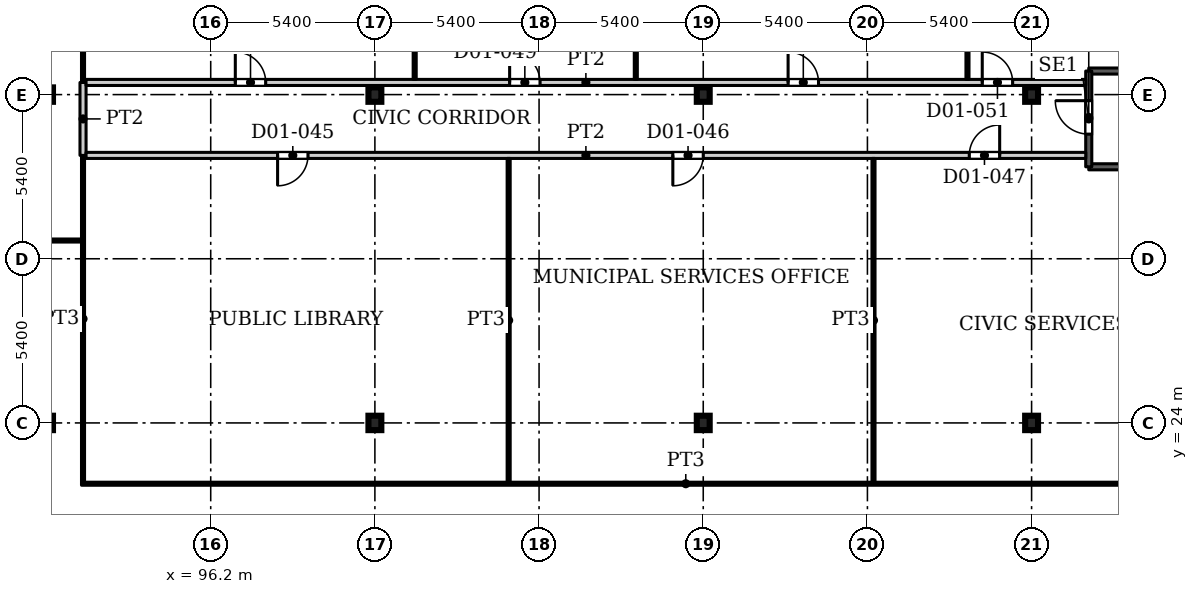
"""IFC4 building model, lengths in metres.
Left out: names, types, materials, properties, quantities, classifications, styles, units other than length and angle.
Written with IfcOpenShell. Run it as: python <this file> out.ifc"""

import sys

from ifc_helpers import new_model, si_unit, direction, frame, frame_2d, origin, origin_2d, place, context, subcontext, project, spatial, rectangle, i_section, extrude, source, transform, mapped, element, fill, save


model = new_model("IFC4")
c1 = context("Model", 3, precision=1e-05, world=origin(), true_north=direction((0.0, 1.0)))
c2 = subcontext(c1, "Body", "Model", "MODEL_VIEW")
j1 = project(units=[si_unit("LENGTHUNIT", "METRE"), si_unit("PLANEANGLEUNIT", "RADIAN")], contexts=[c1])
p1 = place(None, origin())
s1 = spatial("IfcSite", under=j1, at=p1, CompositionType="ELEMENT")
p2 = place(p1, origin())
s2 = spatial("IfcBuilding", under=s1, at=p2, CompositionType="ELEMENT")
p3 = place(p2, frame((0.0, 0.0, 7.5)))
s3 = spatial("IfcBuildingStorey", under=s2, at=p3, CompositionType="ELEMENT", Elevation=7.5)
for number, where, z_axis, x_axis in (
    (1, (90.8, 24.0, 0.0), (0.0, 0.0, 1.0), (1.0, 0.0, 0.0)),
    (2, (101.6, 24.0, 0.0), (0.0, 0.0, 1.0), (1.0, 0.0, 0.0)),
    (3, (112.4, 24.0, 0.0), (0.0, 0.0, 1.0), (1.0, 0.0, 0.0)),
    (4, (123.2, 24.0, 0.0), (0.0, 0.0, 1.0), (1.0, 0.0, 0.0)),
    (5, (90.8, 34.8, 0.0), (0.0, 0.0, 1.0), (1.0, 0.0, 0.0)),
    (6, (101.6, 34.8, 0.0), (0.0, 0.0, 1.0), (1.0, 0.0, 0.0)),
    (7, (112.4, 34.8, 0.0), (0.0, 0.0, 1.0), (1.0, 0.0, 0.0)),
    (8, (123.2, 34.8, 0.0), (0.0, 0.0, 1.0), (1.0, 0.0, 0.0)),
):
    element("IfcColumn", number, at=place(p3, frame(where, z_axis=z_axis, x_axis=x_axis)), inside=s3, PredefinedType="COLUMN", context=c2, shape_type="SweptSolid", body=[
        extrude(i_section(OverallWidth=0.424, OverallDepth=0.474, WebThickness=0.048, FlangeThickness=0.077, FilletRadius=0.014, at=origin_2d()), origin(), (0.0, 0.0, 1.0), 5.0),
    ])
p4 = place(p3, frame((125.08, 32.425, 0.0), z_axis=(0.0, 0.0, 1.0), x_axis=(1.0, 0.0, 0.0)))
e9 = element("IfcWall", 9, at=p4, inside=s3, PredefinedType="SHEAR", context=c2, shape_type="SweptSolid", body=[
    extrude(rectangle(XDim=5.72, YDim=0.2, at=frame_2d((2.86, 0.0))), origin(), (0.0, 0.0, 1.0), 5.0),
])
p5 = place(p3, frame((125.08, 35.575, 0.0), z_axis=(0.0, 0.0, 1.0), x_axis=(1.0, 0.0, 0.0)))
e10 = element("IfcWall", 10, at=p5, inside=s3, PredefinedType="SHEAR", context=c2, shape_type="SweptSolid", body=[
    extrude(rectangle(XDim=6.92, YDim=0.2, at=frame_2d((3.46, 0.0))), origin(), (0.0, 0.0, 1.0), 5.0),
])
p6 = place(p3, frame((125.08, 32.425, 0.0), z_axis=(0.0, 0.0, 1.0), x_axis=(0.0, 1.0, 0.0)))
e11 = element("IfcWall", 11, at=p6, inside=s3, PredefinedType="SHEAR", context=c2, shape_type="SweptSolid", body=[
    extrude(rectangle(XDim=3.15, YDim=0.2, at=frame_2d((1.575, 0.0))), origin(), (0.0, 0.0, 1.0), 5.0),
])
p7 = place(p6, frame((1.075, 0.0, 0.0)))
e12 = element("IfcOpeningElement", 12, at=p7, cuts=e11, PredefinedType="OPENING", context=c2, shape_type="SweptSolid", body=[
    extrude(rectangle(XDim=1.1, YDim=2.2, at=frame_2d((0.55, 1.1))), frame((0.0, 0.11, 0.0), z_axis=(0.0, -1.0, 0.0), x_axis=(1.0, 0.0, 0.0)), (0.0, 0.0, 1.0), 0.22),
])
p8 = place(p3, frame((53.649, 30.0, 0.0), z_axis=(0.0, 0.0, 1.0), x_axis=(1.0, 0.0, 0.0)))
e13 = element("IfcWall", 13, at=p8, inside=s3, PredefinedType="PARTITIONING", context=c2, shape_type="SweptSolid", body=[
    extrude(rectangle(XDim=38.301, YDim=0.1, at=frame_2d((19.15, 0.0))), origin(), (0.0, 0.0, 1.0), 4.68),
])
p9 = place(p3, frame((91.95, 22.0, 0.0), z_axis=(0.0, 0.0, 1.0), x_axis=(1.0, 0.0, 0.0)))
e14 = element("IfcWall", 14, at=p9, inside=s3, PredefinedType="PARTITIONING", context=c2, shape_type="SweptSolid", body=[
    extrude(rectangle(XDim=39.751, YDim=0.1, at=frame_2d((19.875, 0.0))), origin(), (0.0, 0.0, 1.0), 4.68),
])
p10 = place(p3, frame((92.0, 22.05, 0.0), z_axis=(0.0, 0.0, 1.0), x_axis=(0.0, 1.0, 0.0)))
e15 = element("IfcWall", 15, at=p10, inside=s3, PredefinedType="PARTITIONING", context=c2, shape_type="SweptSolid", body=[
    extrude(rectangle(XDim=10.75, YDim=0.1, at=frame_2d((5.375, 0.0))), origin(), (0.0, 0.0, 1.0), 4.68),
])
p11 = place(p3, frame((92.0, 32.8, 0.0), z_axis=(0.0, 0.0, 1.0), x_axis=(0.0, 1.0, 0.0)))
e16 = element("IfcWall", 16, at=p11, inside=s3, PredefinedType="PARTITIONING", context=c2, shape_type="SweptSolid", body=[
    extrude(rectangle(XDim=2.4, YDim=0.2, at=frame_2d((1.2, 0.0))), origin(), (0.0, 0.0, 1.0), 4.68),
])
p12 = place(p3, frame((92.0, 35.2, 0.0), z_axis=(0.0, 0.0, 1.0), x_axis=(0.0, 1.0, 0.0)))
e17 = element("IfcWall", 17, at=p12, inside=s3, PredefinedType="PARTITIONING", context=c2, shape_type="SweptSolid", body=[
    extrude(rectangle(XDim=8.6, YDim=0.1, at=frame_2d((4.3, 0.0))), origin(), (0.0, 0.0, 1.0), 4.68),
])
p13 = place(p3, frame((92.1, 32.8, 0.0), z_axis=(0.0, 0.0, 1.0), x_axis=(1.0, 0.0, 0.0)))
e18 = element("IfcWall", 18, at=p13, inside=s3, PredefinedType="PARTITIONING", context=c2, shape_type="SweptSolid", body=[
    extrude(rectangle(XDim=32.881, YDim=0.2, at=frame_2d((16.44, 0.0))), origin(), (0.0, 0.0, 1.0), 4.68),
])
p14 = place(p13, frame((6.3, 0.0, 0.0)))
e19 = element("IfcOpeningElement", 19, at=p14, cuts=e18, PredefinedType="OPENING", context=c2, shape_type="SweptSolid", body=[
    extrude(rectangle(XDim=1.0, YDim=2.1, at=frame_2d((0.5, 1.05))), frame((0.0, 0.11, 0.0), z_axis=(0.0, -1.0, 0.0), x_axis=(1.0, 0.0, 0.0)), (0.0, 0.0, 1.0), 0.22),
])
p15 = place(p13, frame((19.3, 0.0, 0.0)))
e20 = element("IfcOpeningElement", 20, at=p15, cuts=e18, PredefinedType="OPENING", context=c2, shape_type="SweptSolid", body=[
    extrude(rectangle(XDim=1.0, YDim=2.1, at=frame_2d((0.5, 1.05))), frame((0.0, 0.11, 0.0), z_axis=(0.0, -1.0, 0.0), x_axis=(1.0, 0.0, 0.0)), (0.0, 0.0, 1.0), 0.22),
])
p16 = place(p13, frame((29.05, 0.0, 0.0)))
e21 = element("IfcOpeningElement", 21, at=p16, cuts=e18, PredefinedType="OPENING", context=c2, shape_type="SweptSolid", body=[
    extrude(rectangle(XDim=1.0, YDim=2.1, at=frame_2d((0.5, 1.05))), frame((0.0, 0.11, 0.0), z_axis=(0.0, -1.0, 0.0), x_axis=(1.0, 0.0, 0.0)), (0.0, 0.0, 1.0), 0.22),
])
p17 = place(p3, frame((92.1, 35.2, 0.0), z_axis=(0.0, 0.0, 1.0), x_axis=(1.0, 0.0, 0.0)))
e22 = element("IfcWall", 22, at=p17, inside=s3, PredefinedType="PARTITIONING", context=c2, shape_type="SweptSolid", body=[
    extrude(rectangle(XDim=32.88, YDim=0.2, at=frame_2d((16.44, 0.0))), origin(), (0.0, 0.0, 1.0), 4.68),
])
p18 = place(p17, frame((4.909, 0.0, 0.0)))
e23 = element("IfcOpeningElement", 23, at=p18, cuts=e22, PredefinedType="OPENING", context=c2, shape_type="SweptSolid", body=[
    extrude(rectangle(XDim=1.0, YDim=2.1, at=frame_2d((0.5, 1.05))), frame((0.0, 0.11, 0.0), z_axis=(0.0, -1.0, 0.0), x_axis=(1.0, 0.0, 0.0)), (0.0, 0.0, 1.0), 0.22),
])
p19 = place(p17, frame((13.932, 0.0, 0.0)))
e24 = element("IfcOpeningElement", 24, at=p19, cuts=e22, PredefinedType="OPENING", context=c2, shape_type="SweptSolid", body=[
    extrude(rectangle(XDim=1.0, YDim=2.1, at=frame_2d((0.5, 1.05))), frame((0.0, 0.11, 0.0), z_axis=(0.0, -1.0, 0.0), x_axis=(1.0, 0.0, 0.0)), (0.0, 0.0, 1.0), 0.22),
])
p20 = place(p17, frame((23.091, 0.0, 0.0)))
e25 = element("IfcOpeningElement", 25, at=p20, cuts=e22, PredefinedType="OPENING", context=c2, shape_type="SweptSolid", body=[
    extrude(rectangle(XDim=1.0, YDim=2.1, at=frame_2d((0.5, 1.05))), frame((0.0, 0.11, 0.0), z_axis=(0.0, -1.0, 0.0), x_axis=(1.0, 0.0, 0.0)), (0.0, 0.0, 1.0), 0.22),
])
p21 = place(p17, frame((29.477, 0.0, 0.0)))
e26 = element("IfcOpeningElement", 26, at=p21, cuts=e22, PredefinedType="OPENING", context=c2, shape_type="SweptSolid", body=[
    extrude(rectangle(XDim=1.0, YDim=2.1, at=frame_2d((0.5, 1.05))), frame((0.0, 0.11, 0.0), z_axis=(0.0, -1.0, 0.0), x_axis=(1.0, 0.0, 0.0)), (0.0, 0.0, 1.0), 0.22),
])
p22 = place(p3, frame((102.909, 35.3, 0.0), z_axis=(0.0, 0.0, 1.0), x_axis=(0.0, 1.0, 0.0)))
e27 = element("IfcWall", 27, at=p22, inside=s3, PredefinedType="PARTITIONING", context=c2, shape_type="SweptSolid", body=[
    extrude(rectangle(XDim=12.65, YDim=0.1, at=frame_2d((6.325, 0.0))), origin(), (0.0, 0.0, 1.0), 4.68),
])
p23 = place(p3, frame((106.0, 22.05, 0.0), z_axis=(0.0, 0.0, 1.0), x_axis=(0.0, 1.0, 0.0)))
e28 = element("IfcWall", 28, at=p23, inside=s3, PredefinedType="PARTITIONING", context=c2, shape_type="SweptSolid", body=[
    extrude(rectangle(XDim=10.65, YDim=0.1, at=frame_2d((5.325, 0.0))), origin(), (0.0, 0.0, 1.0), 4.68),
])
p24 = place(p3, frame((110.182, 35.3, 0.0), z_axis=(0.0, 0.0, 1.0), x_axis=(0.0, 1.0, 0.0)))
e29 = element("IfcWall", 29, at=p24, inside=s3, PredefinedType="PARTITIONING", context=c2, shape_type="SweptSolid", body=[
    extrude(rectangle(XDim=12.65, YDim=0.1, at=frame_2d((6.325, 0.0))), origin(), (0.0, 0.0, 1.0), 4.68),
])
p25 = place(p3, frame((118.0, 22.05, 0.0), z_axis=(0.0, 0.0, 1.0), x_axis=(0.0, 1.0, 0.0)))
e30 = element("IfcWall", 30, at=p25, inside=s3, PredefinedType="PARTITIONING", context=c2, shape_type="SweptSolid", body=[
    extrude(rectangle(XDim=10.65, YDim=0.1, at=frame_2d((5.325, 0.0))), origin(), (0.0, 0.0, 1.0), 4.68),
])
p26 = place(p3, frame((121.091, 35.3, 0.0), z_axis=(0.0, 0.0, 1.0), x_axis=(0.0, 1.0, 0.0)))
e31 = element("IfcWall", 31, at=p26, inside=s3, PredefinedType="PARTITIONING", context=c2, shape_type="SweptSolid", body=[
    extrude(rectangle(XDim=8.638, YDim=0.1, at=frame_2d((4.319, 0.0))), origin(), (0.0, 0.0, 1.0), 4.68),
])
m1 = source(origin(), c2, "Body", "SweptSolid", [
    extrude(rectangle(XDim=1.1, YDim=2.2, at=frame_2d((0.55, 1.1))), frame((0.0, 0.025, 0.0), z_axis=(0.0, -1.0, 0.0), x_axis=(1.0, 0.0, 0.0)), (0.0, 0.0, 1.0), 0.05),
])
p27 = place(p7, origin())
e32 = element("IfcDoor", 32, at=p27, inside=s3, OperationType="SINGLE_SWING_LEFT", PredefinedType="DOOR", context=c2, shape_type="MappedRepresentation", body=[
    mapped(m1, transform((0.0, 0.0, 0.0), x_axis=(1.0, 0.0, 0.0), y_axis=(0.0, 1.0, 0.0), z_axis=(0.0, 0.0, 1.0), scale=1.0)),
])
fill(e12, e32)
m2 = source(origin(), c2, "Body", "SweptSolid", [
    extrude(rectangle(XDim=1.0, YDim=2.1, at=frame_2d((0.5, 1.05))), frame((0.0, 0.025, 0.0), z_axis=(0.0, -1.0, 0.0), x_axis=(1.0, 0.0, 0.0)), (0.0, 0.0, 1.0), 0.05),
])
p28 = place(p14, origin())
e33 = element("IfcDoor", 33, at=p28, inside=s3, OperationType="SINGLE_SWING_RIGHT", PredefinedType="DOOR", context=c2, shape_type="MappedRepresentation", body=[
    mapped(m2, transform((0.0, 0.0, 0.0), x_axis=(1.0, 0.0, 0.0), y_axis=(0.0, 1.0, 0.0), z_axis=(0.0, 0.0, 1.0), scale=1.0)),
])
fill(e19, e33)
p29 = place(p15, origin())
e34 = element("IfcDoor", 34, at=p29, inside=s3, OperationType="SINGLE_SWING_RIGHT", PredefinedType="DOOR", context=c2, shape_type="MappedRepresentation", body=[
    mapped(m2, transform((0.0, 0.0, 0.0), x_axis=(1.0, 0.0, 0.0), y_axis=(0.0, 1.0, 0.0), z_axis=(0.0, 0.0, 1.0), scale=1.0)),
])
fill(e20, e34)
p30 = place(p16, origin())
e35 = element("IfcDoor", 35, at=p30, inside=s3, OperationType="SINGLE_SWING_LEFT", PredefinedType="DOOR", context=c2, shape_type="MappedRepresentation", body=[
    mapped(m2, transform((0.0, 0.0, 0.0), x_axis=(1.0, 0.0, 0.0), y_axis=(0.0, 1.0, 0.0), z_axis=(0.0, 0.0, 1.0), scale=1.0)),
])
fill(e21, e35)
p31 = place(p18, origin())
e36 = element("IfcDoor", 36, at=p31, inside=s3, OperationType="SINGLE_SWING_LEFT", PredefinedType="DOOR", context=c2, shape_type="MappedRepresentation", body=[
    mapped(m2, transform((0.0, 0.0, 0.0), x_axis=(1.0, 0.0, 0.0), y_axis=(0.0, 1.0, 0.0), z_axis=(0.0, 0.0, 1.0), scale=1.0)),
])
fill(e23, e36)
p32 = place(p19, origin())
e37 = element("IfcDoor", 37, at=p32, inside=s3, OperationType="SINGLE_SWING_LEFT", PredefinedType="DOOR", context=c2, shape_type="MappedRepresentation", body=[
    mapped(m2, transform((0.0, 0.0, 0.0), x_axis=(1.0, 0.0, 0.0), y_axis=(0.0, 1.0, 0.0), z_axis=(0.0, 0.0, 1.0), scale=1.0)),
])
fill(e24, e37)
p33 = place(p20, origin())
e38 = element("IfcDoor", 38, at=p33, inside=s3, OperationType="SINGLE_SWING_LEFT", PredefinedType="DOOR", context=c2, shape_type="MappedRepresentation", body=[
    mapped(m2, transform((0.0, 0.0, 0.0), x_axis=(1.0, 0.0, 0.0), y_axis=(0.0, 1.0, 0.0), z_axis=(0.0, 0.0, 1.0), scale=1.0)),
])
fill(e25, e38)
p34 = place(p21, origin())
e39 = element("IfcDoor", 39, at=p34, inside=s3, OperationType="SINGLE_SWING_LEFT", PredefinedType="DOOR", context=c2, shape_type="MappedRepresentation", body=[
    mapped(m2, transform((0.0, 0.0, 0.0), x_axis=(1.0, 0.0, 0.0), y_axis=(0.0, 1.0, 0.0), z_axis=(0.0, 0.0, 1.0), scale=1.0)),
])
fill(e26, e39)
save(model, sys.argv[1])
